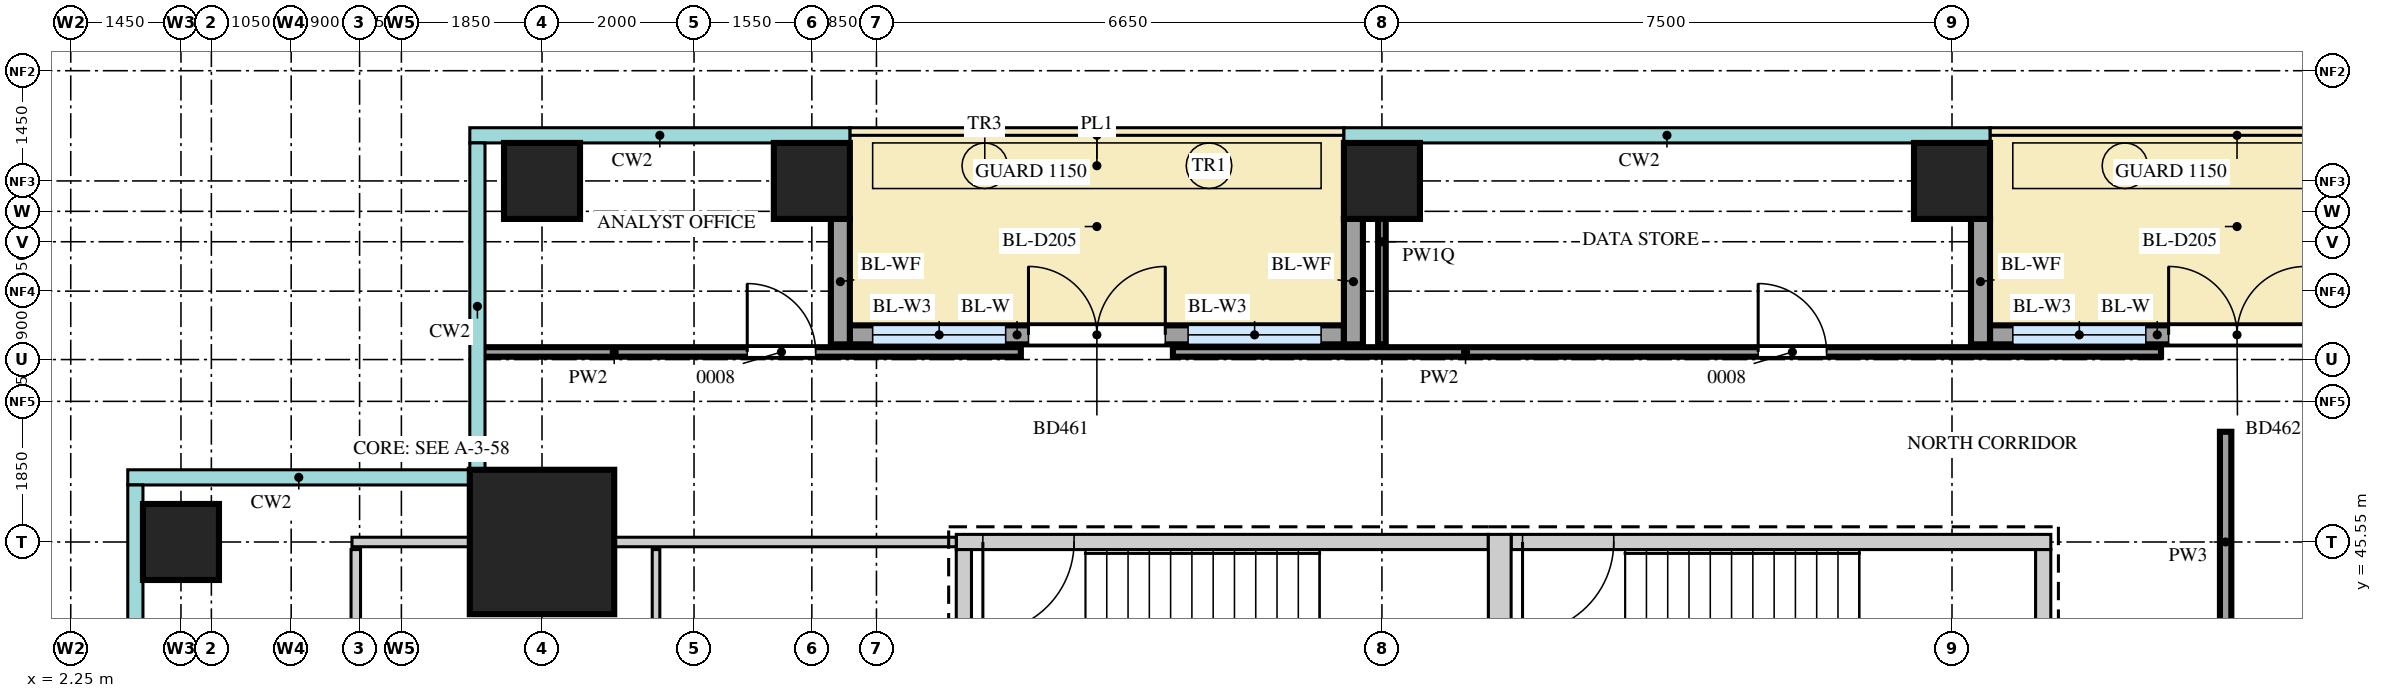
"""IFC4 building model, lengths in metres.
Left out: names, types, materials, properties, quantities, classifications, styles, units other than length and angle.
Written with IfcOpenShell. Run it as: python <this file> out.ifc"""

import sys

from ifc_helpers import new_model, si_unit, direction, frame, frame_2d, origin, origin_2d, place, context, subcontext, project, spatial, rectangle, extrude, source, transform, mapped, element, fill, save


model = new_model("IFC4")
c1 = context("Model", 3, precision=1e-05, world=origin(), true_north=direction((0.0, 1.0)))
c2 = subcontext(c1, "Body", "Model", "MODEL_VIEW")
j1 = project(units=[si_unit("LENGTHUNIT", "METRE"), si_unit("PLANEANGLEUNIT", "RADIAN")], contexts=[c1])
p1 = place(None, origin())
s1 = spatial("IfcSite", under=j1, at=p1, CompositionType="ELEMENT")
p2 = place(p1, origin())
s2 = spatial("IfcBuilding", under=s1, at=p2, CompositionType="ELEMENT")
p3 = place(p2, frame((0.0, 0.0, 208.7)))
s3 = spatial("IfcBuildingStorey", under=s2, at=p3, CompositionType="ELEMENT", Elevation=208.7)
m1 = source(origin(), c2, "Body", "SweptSolid", [
    extrude(rectangle(XDim=7.0, YDim=0.2, at=frame_2d((3.5, 0.0))), origin(), (0.0, 0.0, 1.0), 3.75),
])
p4 = place(p3, frame((13.9, 45.55, 0.0), z_axis=(0.0, 0.0, 1.0), x_axis=(1.0, 0.0, 0.0)))
e1 = element("IfcWall", 1, at=p4, inside=s3, PredefinedType="SHEAR", context=c2, shape_type="MappedRepresentation", body=[
    mapped(m1, transform((0.0, 0.0, 0.0))),
])
m2 = source(origin(), c2, "Body", "SweptSolid", [
    extrude(rectangle(XDim=1.2, YDim=2.1, at=frame_2d((0.6, 1.05))), frame((0.0, 0.11, 0.0), z_axis=(0.0, -1.0, 0.0), x_axis=(1.0, 0.0, 0.0)), (0.0, 0.0, 1.0), 0.22),
])
p5 = place(p4, frame((0.35, 0.0, 0.0)))
e2 = element("IfcOpeningElement", 2, at=p5, cuts=e1, PredefinedType="OPENING", context=c2, shape_type="MappedRepresentation", body=[
    mapped(m2, transform((0.0, 0.0, 0.0))),
])
m3 = source(origin(), c2, "Body", "SweptSolid", [
    extrude(rectangle(XDim=7.1, YDim=0.2, at=frame_2d((3.55, 0.0))), origin(), (0.0, 0.0, 1.0), 3.75),
])
p6 = place(p3, frame((21.2, 45.55, 0.0), z_axis=(0.0, 0.0, 1.0), x_axis=(1.0, 0.0, 0.0)))
e3 = element("IfcWall", 3, at=p6, inside=s3, PredefinedType="SHEAR", context=c2, shape_type="MappedRepresentation", body=[
    mapped(m3, transform((0.0, 0.0, 0.0))),
])
p7 = place(p6, frame((0.15, 0.0, 0.0)))
e4 = element("IfcOpeningElement", 4, at=p7, cuts=e3, PredefinedType="OPENING", context=c2, shape_type="MappedRepresentation", body=[
    mapped(m2, transform((0.0, 0.0, 0.0))),
])
m4 = source(origin(), c2, "Body", "SweptSolid", [
    extrude(rectangle(XDim=3.75, YDim=0.3, at=frame_2d((1.875, 0.0))), origin(), (0.0, 0.0, 1.0), 3.75),
])
p8 = place(p3, frame((21.05, 41.9, 0.0), z_axis=(0.0, 0.0, 1.0), x_axis=(0.0, 1.0, 0.0)))
e5 = element("IfcWall", 5, at=p8, inside=s3, PredefinedType="SHEAR", context=c2, shape_type="MappedRepresentation", body=[
    mapped(m4, transform((0.0, 0.0, 0.0))),
])
m5 = source(origin(), c2, "Body", "SweptSolid", [
    extrude(rectangle(XDim=3.35, YDim=0.2, at=frame_2d((1.675, 0.0))), origin(), (0.0, 0.0, 1.0), 3.75),
])
for number, where, z_axis, x_axis in (
    (6, (14.0, 42.1, 0.0), (0.0, 0.0, 1.0), (0.0, 1.0, 0.0)),
    (7, (28.2, 42.1, 0.0), (0.0, 0.0, 1.0), (0.0, 1.0, 0.0)),
):
    element("IfcWall", number, at=place(p3, frame(where, z_axis=z_axis, x_axis=x_axis)), inside=s3, PredefinedType="SHEAR", context=c2, shape_type="MappedRepresentation", body=[
        mapped(m5, transform((0.0, 0.0, 0.0))),
    ])
m6 = source(origin(), c2, "Body", "SweptSolid", [
    extrude(rectangle(XDim=1.9, YDim=1.9, at=origin_2d()), origin(), (0.0, 0.0, 1.0), 4.0),
])
p9 = place(p3, frame((8.45, 45.55, 0.0), z_axis=(0.0, 0.0, 1.0), x_axis=(1.0, 0.0, 0.0)))
e8 = element("IfcColumn", 8, at=p9, inside=s3, PredefinedType="COLUMN", context=c2, shape_type="MappedRepresentation", body=[
    mapped(m6, transform((0.0, 0.0, 0.0))),
])
m7 = source(origin(), c2, "Body", "SweptSolid", [
    extrude(rectangle(XDim=1.0, YDim=1.0, at=origin_2d()), origin(), (0.0, 0.0, 1.0), 3.75),
])
for number, where, z_axis, x_axis in (
    (9, (8.45, 50.3, 0.0), (0.0, 0.0, 1.0), (1.0, 0.0, 0.0)),
    (10, (12.0, 50.3, 0.0), (0.0, 0.0, 1.0), (1.0, 0.0, 0.0)),
    (11, (19.5, 50.3, 0.0), (0.0, 0.0, 1.0), (1.0, 0.0, 0.0)),
    (12, (27.0, 50.3, 0.0), (0.0, 0.0, 1.0), (1.0, 0.0, 0.0)),
    (13, (3.7, 45.55, 0.0), (0.0, 0.0, 1.0), (1.0, 0.0, 0.0)),
):
    element("IfcColumn", number, at=place(p3, frame(where, z_axis=z_axis, x_axis=x_axis)), inside=s3, PredefinedType="COLUMN", context=c2, shape_type="MappedRepresentation", body=[
        mapped(m7, transform((0.0, 0.0, 0.0))),
    ])
m8 = source(origin(), c2, "Body", "SweptSolid", [
    extrude(rectangle(XDim=6.5, YDim=0.25, at=frame_2d((3.25, 0.0))), origin(), (0.0, 0.0, 1.0), 3.75),
])
p10 = place(p3, frame((12.5, 48.275, 0.0), z_axis=(0.0, 0.0, 1.0), x_axis=(1.0, 0.0, 0.0)))
e14 = element("IfcWall", 14, at=p10, inside=s3, PredefinedType="SOLIDWALL", context=c2, shape_type="MappedRepresentation", body=[
    mapped(m8, transform((0.0, 0.0, 0.0))),
])
m9 = source(origin(), c2, "Body", "SweptSolid", [
    extrude(rectangle(XDim=1.75, YDim=2.4, at=frame_2d((0.875, 1.2))), frame((0.0, 0.135, 0.0), z_axis=(0.0, -1.0, 0.0), x_axis=(1.0, 0.0, 0.0)), (0.0, 0.0, 1.0), 0.27),
])
p11 = place(p10, frame((0.3, 0.0, 0.0)))
e15 = element("IfcOpeningElement", 15, at=p11, cuts=e14, PredefinedType="OPENING", context=c2, shape_type="MappedRepresentation", body=[
    mapped(m9, transform((0.0, 0.0, 0.0))),
])
p12 = place(p10, frame((4.45, 0.0, 0.0)))
e16 = element("IfcOpeningElement", 16, at=p12, cuts=e14, PredefinedType="OPENING", context=c2, shape_type="MappedRepresentation", body=[
    mapped(m9, transform((0.0, 0.0, 0.0))),
])
m10 = source(origin(), c2, "Body", "SweptSolid", [
    extrude(rectangle(XDim=1.8, YDim=2.4, at=frame_2d((0.9, 1.2))), frame((0.0, 0.135, 0.0), z_axis=(0.0, -1.0, 0.0), x_axis=(1.0, 0.0, 0.0)), (0.0, 0.0, 1.0), 0.27),
])
p13 = place(p10, frame((2.35, 0.0, 0.0)))
e17 = element("IfcOpeningElement", 17, at=p13, cuts=e14, PredefinedType="OPENING", context=c2, shape_type="MappedRepresentation", body=[
    mapped(m10, transform((0.0, 0.0, 0.0))),
])
m11 = source(origin(), c2, "Body", "SweptSolid", [
    extrude(rectangle(XDim=1.65, YDim=0.25, at=frame_2d((0.825, 0.0))), origin(), (0.0, 0.0, 1.0), 3.45),
])
for number, where, z_axis, x_axis in (
    (18, (12.375, 49.8, 0.0), (0.0, 0.0, 1.0), (0.0, -1.0, 0.0)),
    (19, (19.125, 49.8, 0.0), (0.0, 0.0, 1.0), (0.0, -1.0, 0.0)),
):
    element("IfcWall", number, at=place(p3, frame(where, z_axis=z_axis, x_axis=x_axis)), inside=s3, PredefinedType="SOLIDWALL", context=c2, shape_type="MappedRepresentation", body=[
        mapped(m11, transform((0.0, 0.0, 0.0))),
    ])
p14 = place(p3, frame((27.5, 48.275, 0.0), z_axis=(0.0, 0.0, 1.0), x_axis=(1.0, 0.0, 0.0)))
e20 = element("IfcWall", 20, at=p14, inside=s3, PredefinedType="SOLIDWALL", context=c2, shape_type="MappedRepresentation", body=[
    mapped(m8, transform((0.0, 0.0, 0.0))),
])
p15 = place(p14, frame((0.3, 0.0, 0.0)))
e21 = element("IfcOpeningElement", 21, at=p15, cuts=e20, PredefinedType="OPENING", context=c2, shape_type="MappedRepresentation", body=[
    mapped(m9, transform((0.0, 0.0, 0.0))),
])
p16 = place(p14, frame((4.45, 0.0, 0.0)))
e22 = element("IfcOpeningElement", 22, at=p16, cuts=e20, PredefinedType="OPENING", context=c2, shape_type="MappedRepresentation", body=[
    mapped(m9, transform((0.0, 0.0, 0.0))),
])
p17 = place(p14, frame((2.35, 0.0, 0.0)))
e23 = element("IfcOpeningElement", 23, at=p17, cuts=e20, PredefinedType="OPENING", context=c2, shape_type="MappedRepresentation", body=[
    mapped(m10, transform((0.0, 0.0, 0.0))),
])
p18 = place(p3, frame((27.375, 49.8, 0.0), z_axis=(0.0, 0.0, 1.0), x_axis=(0.0, -1.0, 0.0)))
e24 = element("IfcWall", 24, at=p18, inside=s3, PredefinedType="SOLIDWALL", context=c2, shape_type="MappedRepresentation", body=[
    mapped(m11, transform((0.0, 0.0, 0.0))),
])
m12 = source(origin(), c2, "Body", "SweptSolid", [
    extrude(rectangle(XDim=3.45, YDim=0.125, at=frame_2d((1.725, 0.0))), origin(), (0.0, 0.0, 1.0), 3.8),
])
p19 = place(p3, frame((6.0, 42.0, 0.0), z_axis=(0.0, 0.0, 1.0), x_axis=(0.0, 1.0, 0.0)))
e25 = element("IfcWall", 25, at=p19, inside=s3, PredefinedType="PARTITIONING", context=c2, shape_type="MappedRepresentation", body=[
    mapped(m12, transform((0.0, 0.0, 0.0))),
])
m13 = source(origin(), c2, "Body", "SweptSolid", [
    extrude(rectangle(XDim=3.45, YDim=0.1, at=frame_2d((1.725, 0.0))), origin(), (0.0, 0.0, 1.0), 3.8),
])
p20 = place(p3, frame((9.95, 42.0, 0.0), z_axis=(0.0, 0.0, 1.0), x_axis=(0.0, 1.0, 0.0)))
e26 = element("IfcWall", 26, at=p20, inside=s3, PredefinedType="PARTITIONING", context=c2, shape_type="MappedRepresentation", body=[
    mapped(m13, transform((0.0, 0.0, 0.0))),
])
m14 = source(origin(), c2, "Body", "SweptSolid", [
    extrude(rectangle(XDim=2.9, YDim=0.15, at=frame_2d((1.45, 0.0))), origin(), (0.0, 0.0, 1.0), 3.8),
])
p21 = place(p3, frame((30.6, 44.1, 0.0), z_axis=(0.0, 0.0, 1.0), x_axis=(0.0, 1.0, 0.0)))
e27 = element("IfcWall", 27, at=p21, inside=s3, PredefinedType="PARTITIONING", context=c2, shape_type="MappedRepresentation", body=[
    mapped(m14, transform((0.0, 0.0, 0.0))),
])
m15 = source(origin(), c2, "Body", "SweptSolid", [
    extrude(rectangle(XDim=7.95, YDim=0.125, at=frame_2d((3.975, 0.0))), origin(), (0.0, 0.0, 1.0), 3.25),
])
p22 = place(p3, frame((5.95, 45.55, 0.0), z_axis=(0.0, 0.0, 1.0), x_axis=(1.0, 0.0, 0.0)))
e28 = element("IfcWall", 28, at=p22, inside=s3, PredefinedType="PARTITIONING", context=c2, shape_type="MappedRepresentation", body=[
    mapped(m15, transform((0.0, 0.0, 0.0))),
])
m16 = source(origin(), c2, "Body", "SweptSolid", [
    extrude(rectangle(XDim=2.7, YDim=0.1, at=frame_2d((1.35, 0.0))), origin(), (0.0, 0.0, 1.0), 3.42),
])
p23 = place(p3, frame((19.5, 48.15, 0.0), z_axis=(0.0, 0.0, 1.0), x_axis=(0.0, 1.0, 0.0)))
e29 = element("IfcWall", 29, at=p23, inside=s3, PredefinedType="PARTITIONING", context=c2, shape_type="MappedRepresentation", body=[
    mapped(m16, transform((0.0, 0.0, 0.0))),
])
m17 = source(origin(), c2, "Body", "SweptSolid", [
    extrude(rectangle(XDim=7.1, YDim=0.125, at=frame_2d((3.55, 0.0))), origin(), (0.0, 0.0, 1.0), 3.8),
])
p24 = place(p3, frame((7.65, 48.05, 0.0), z_axis=(0.0, 0.0, 1.0), x_axis=(1.0, 0.0, 0.0)))
e30 = element("IfcWall", 30, at=p24, inside=s3, PredefinedType="PARTITIONING", context=c2, shape_type="MappedRepresentation", body=[
    mapped(m17, transform((0.0, 0.0, 0.0))),
])
m18 = source(origin(), c2, "Body", "SweptSolid", [
    extrude(rectangle(XDim=0.9, YDim=2.1, at=frame_2d((0.45, 1.05))), frame((0.0, 0.073, 0.0), z_axis=(0.0, -1.0, 0.0), x_axis=(1.0, 0.0, 0.0)), (0.0, 0.0, 1.0), 0.145),
])
p25 = place(p24, frame((3.5, 0.0, 0.0)))
e31 = element("IfcOpeningElement", 31, at=p25, cuts=e30, PredefinedType="OPENING", context=c2, shape_type="MappedRepresentation", body=[
    mapped(m18, transform((0.0, 0.0, 0.0))),
])
m19 = source(origin(), c2, "Body", "SweptSolid", [
    extrude(rectangle(XDim=13.0, YDim=0.125, at=frame_2d((6.5, 0.0))), origin(), (0.0, 0.0, 1.0), 3.8),
])
p26 = place(p3, frame((16.75, 48.05, 0.0), z_axis=(0.0, 0.0, 1.0), x_axis=(1.0, 0.0, 0.0)))
e32 = element("IfcWall", 32, at=p26, inside=s3, PredefinedType="PARTITIONING", context=c2, shape_type="MappedRepresentation", body=[
    mapped(m19, transform((0.0, 0.0, 0.0))),
])
p27 = place(p26, frame((7.7, 0.0, 0.0)))
e33 = element("IfcOpeningElement", 33, at=p27, cuts=e32, PredefinedType="OPENING", context=c2, shape_type="MappedRepresentation", body=[
    mapped(m18, transform((0.0, 0.0, 0.0))),
])
m20 = source(origin(), c2, "Body", "SweptSolid", [
    extrude(rectangle(XDim=1.75, YDim=2.4, at=frame_2d((0.875, 1.2))), frame((0.0, 0.03, 0.0), z_axis=(0.0, -1.0, 0.0), x_axis=(1.0, 0.0, 0.0)), (0.0, 0.0, 1.0), 0.06),
])
p28 = place(p11, origin())
e34 = element("IfcWindow", 34, at=p28, inside=s3, PartitioningType="SINGLE_PANEL", PredefinedType="WINDOW", context=c2, shape_type="MappedRepresentation", body=[
    mapped(m20, transform((0.0, 0.0, 0.0))),
])
fill(e15, e34)
p29 = place(p12, origin())
e35 = element("IfcWindow", 35, at=p29, inside=s3, PartitioningType="SINGLE_PANEL", PredefinedType="WINDOW", context=c2, shape_type="MappedRepresentation", body=[
    mapped(m20, transform((0.0, 0.0, 0.0))),
])
fill(e16, e35)
m21 = source(origin(), c2, "Body", "SweptSolid", [
    extrude(rectangle(XDim=1.8, YDim=2.4, at=frame_2d((0.9, 1.2))), frame((0.0, 0.025, 0.0), z_axis=(0.0, -1.0, 0.0), x_axis=(1.0, 0.0, 0.0)), (0.0, 0.0, 1.0), 0.05),
])
p30 = place(p13, origin())
e36 = element("IfcDoor", 36, at=p30, inside=s3, OperationType="DOUBLE_DOOR_DOUBLE_SWING", PredefinedType="DOOR", context=c2, shape_type="MappedRepresentation", body=[
    mapped(m21, transform((0.0, 0.0, 0.0))),
])
fill(e17, e36)
p31 = place(p15, origin())
e37 = element("IfcWindow", 37, at=p31, inside=s3, PartitioningType="SINGLE_PANEL", PredefinedType="WINDOW", context=c2, shape_type="MappedRepresentation", body=[
    mapped(m20, transform((0.0, 0.0, 0.0))),
])
fill(e21, e37)
p32 = place(p17, origin())
e38 = element("IfcDoor", 38, at=p32, inside=s3, OperationType="DOUBLE_DOOR_DOUBLE_SWING", PredefinedType="DOOR", context=c2, shape_type="MappedRepresentation", body=[
    mapped(m21, transform((0.0, 0.0, 0.0))),
])
fill(e23, e38)
m22 = source(origin(), c2, "Body", "SweptSolid", [
    extrude(rectangle(XDim=0.9, YDim=2.1, at=frame_2d((0.45, 1.05))), frame((0.0, 0.025, 0.0), z_axis=(0.0, -1.0, 0.0), x_axis=(1.0, 0.0, 0.0)), (0.0, 0.0, 1.0), 0.05),
])
p33 = place(p25, origin())
e39 = element("IfcDoor", 39, at=p33, inside=s3, OperationType="SINGLE_SWING_RIGHT", PredefinedType="DOOR", context=c2, shape_type="MappedRepresentation", body=[
    mapped(m22, transform((0.0, 0.0, 0.0))),
])
fill(e31, e39)
p34 = place(p27, origin())
e40 = element("IfcDoor", 40, at=p34, inside=s3, OperationType="SINGLE_SWING_RIGHT", PredefinedType="DOOR", context=c2, shape_type="MappedRepresentation", body=[
    mapped(m22, transform((0.0, 0.0, 0.0))),
])
fill(e33, e40)
m23 = source(origin(), c2, "Body", "SweptSolid", [
    extrude(rectangle(XDim=1.2, YDim=2.1, at=frame_2d((0.6, 1.05))), frame((0.0, 0.025, 0.0), z_axis=(0.0, -1.0, 0.0), x_axis=(1.0, 0.0, 0.0)), (0.0, 0.0, 1.0), 0.05),
])
p35 = place(p5, origin())
e41 = element("IfcDoor", 41, at=p35, inside=s3, OperationType="SINGLE_SWING_LEFT", PredefinedType="DOOR", context=c2, shape_type="MappedRepresentation", body=[
    mapped(m23, transform((0.0, 0.0, 0.0))),
])
fill(e2, e41)
p36 = place(p7, origin())
e42 = element("IfcDoor", 42, at=p36, inside=s3, OperationType="SINGLE_SWING_LEFT", PredefinedType="DOOR", context=c2, shape_type="MappedRepresentation", body=[
    mapped(m23, transform((0.0, 0.0, 0.0))),
])
fill(e4, e42)
save(model, sys.argv[1])
